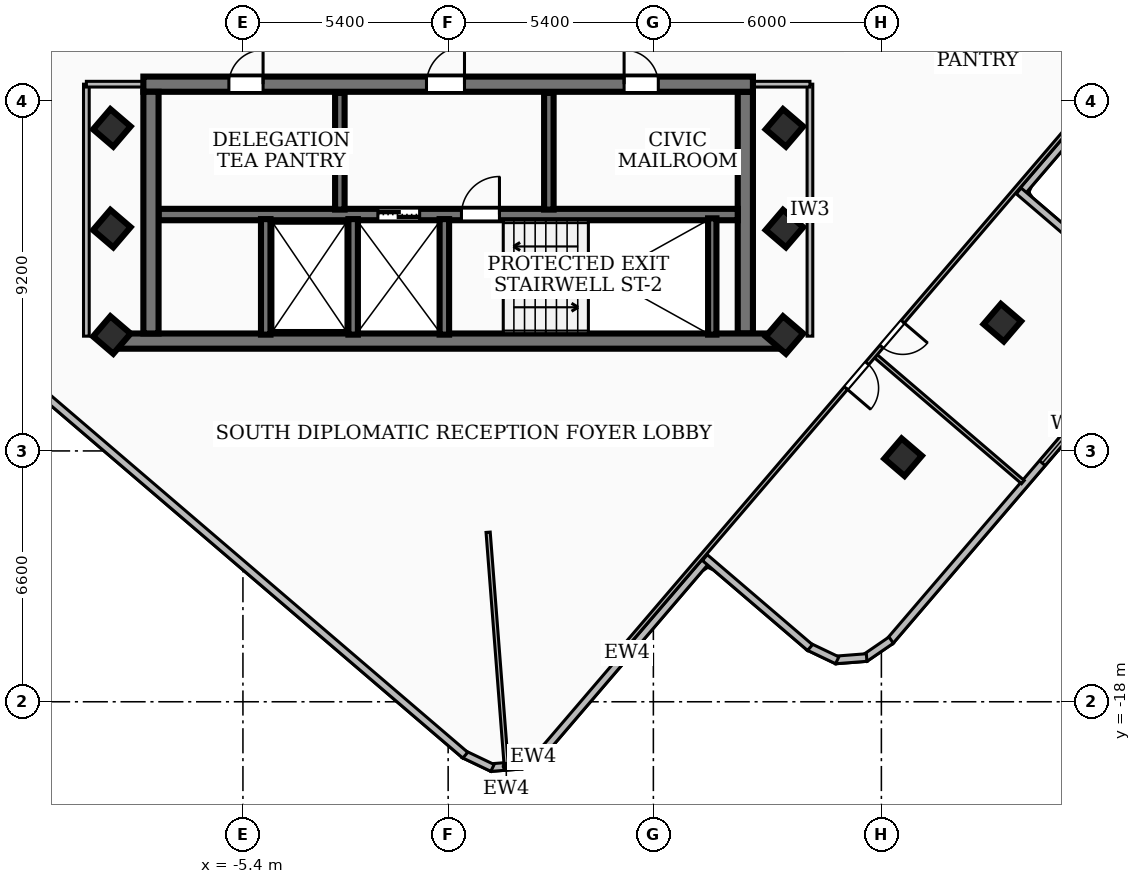
"""IFC4 building model, lengths in metres.
Left out: names, types, materials, properties, quantities, classifications, styles, units other than length and angle.
Written with IfcOpenShell. Run it as: python <this file> out.ifc"""

import sys

from ifc_helpers import new_model, si_unit, direction, frame, frame_2d, origin, origin_2d, place, context, subcontext, project, spatial, rectangle, extrude, element, fill, save


model = new_model("IFC4")
c1 = context("Model", 3, precision=1e-05, world=origin(), true_north=direction((0.0, 1.0)))
c2 = subcontext(c1, "Body", "Model", "MODEL_VIEW")
j1 = project(units=[si_unit("LENGTHUNIT", "METRE"), si_unit("PLANEANGLEUNIT", "RADIAN")], contexts=[c1])
p1 = place(None, origin())
s1 = spatial("IfcSite", under=j1, at=p1, CompositionType="ELEMENT")
p2 = place(p1, origin())
s2 = spatial("IfcBuilding", under=s1, at=p2, CompositionType="ELEMENT")
p3 = place(p2, frame((0.0, 0.0, 254.34)))
s3 = spatial("IfcBuildingStorey", under=s2, at=p3, CompositionType="ELEMENT", Elevation=254.34)
p4 = place(p3, frame((8.78, -8.51, 0.0), z_axis=(0.0, 0.0, 1.0), x_axis=(-1.0, 0.0, 0.0)))
e1 = element("IfcWall", 1, at=p4, inside=s3, PredefinedType="SHEAR", context=c2, shape_type="SweptSolid", body=[
    extrude(rectangle(XDim=17.56, YDim=0.4, at=frame_2d((8.78, 0.0))), origin(), (0.0, 0.0, 1.0), 3.16),
])
p5 = place(p3, frame((-8.02, -1.75, 0.0), z_axis=(0.0, 0.0, 1.0), x_axis=(1.0, 0.0, 0.0)))
e2 = element("IfcWall", 2, at=p5, inside=s3, PredefinedType="SHEAR", context=c2, shape_type="SweptSolid", body=[
    extrude(rectangle(XDim=16.04, YDim=0.4, at=frame_2d((8.02, 0.0))), origin(), (0.0, 0.0, 1.0), 3.16),
])
p6 = place(p5, frame((7.45, 0.0, 0.0)))
e3 = element("IfcOpeningElement", 3, at=p6, cuts=e2, PredefinedType="OPENING", context=c2, shape_type="SweptSolid", body=[
    extrude(rectangle(XDim=1.0, YDim=2.1, at=frame_2d((0.5, 1.05))), frame((0.0, 0.21, 0.0), z_axis=(0.0, -1.0, 0.0), x_axis=(1.0, 0.0, 0.0)), (0.0, 0.0, 1.0), 0.42),
])
p7 = place(p5, frame((12.65, 0.0, 0.0)))
e4 = element("IfcOpeningElement", 4, at=p7, cuts=e2, PredefinedType="OPENING", context=c2, shape_type="SweptSolid", body=[
    extrude(rectangle(XDim=0.9, YDim=2.06, at=frame_2d((0.45, 1.03))), frame((0.0, 0.21, 0.0), z_axis=(0.0, -1.0, 0.0), x_axis=(1.0, 0.0, 0.0)), (0.0, 0.0, 1.0), 0.42),
])
p8 = place(p5, frame((2.25, 0.0, 0.0)))
e5 = element("IfcOpeningElement", 5, at=p8, cuts=e2, PredefinedType="OPENING", context=c2, shape_type="SweptSolid", body=[
    extrude(rectangle(XDim=0.9, YDim=2.06, at=frame_2d((0.45, 1.03))), frame((0.0, 0.21, 0.0), z_axis=(0.0, -1.0, 0.0), x_axis=(1.0, 0.0, 0.0)), (0.0, 0.0, 1.0), 0.42),
])
for number, where, z_axis, x_axis in (
    (6, (-7.82, -8.31, 0.0), (0.0, 0.0, 1.0), (0.0, 1.0, 0.0)),
    (7, (7.82, -1.95, 0.0), (0.0, 0.0, 1.0), (0.0, -1.0, 0.0)),
):
    element("IfcWall", number, at=place(p3, frame(where, z_axis=z_axis, x_axis=x_axis)), inside=s3, PredefinedType="SHEAR", context=c2, shape_type="SweptSolid", body=[
        extrude(rectangle(XDim=6.36, YDim=0.4, at=frame_2d((3.18, 0.0))), origin(), (0.0, 0.0, 1.0), 3.16),
    ])
p9 = place(p3, frame((-7.62, -5.18, 0.0), z_axis=(0.0, 0.0, 1.0), x_axis=(1.0, 0.0, 0.0)))
e8 = element("IfcWall", 8, at=p9, inside=s3, PredefinedType="SOLIDWALL", context=c2, shape_type="SweptSolid", body=[
    extrude(rectangle(XDim=15.24, YDim=0.3, at=frame_2d((7.62, 0.0))), origin(), (0.0, 0.0, 1.0), 3.16),
])
p10 = place(p9, frame((5.77, 0.0, 0.0)))
e9 = element("IfcOpeningElement", 9, at=p10, cuts=e8, PredefinedType="OPENING", context=c2, shape_type="SweptSolid", body=[
    extrude(rectangle(XDim=1.1, YDim=2.15, at=frame_2d((0.55, 1.075))), frame((0.0, 0.16, 0.0), z_axis=(0.0, -1.0, 0.0), x_axis=(1.0, 0.0, 0.0)), (0.0, 0.0, 1.0), 0.32),
])
p11 = place(p9, frame((7.97, 0.0, 0.0)))
e10 = element("IfcOpeningElement", 10, at=p11, cuts=e8, PredefinedType="OPENING", context=c2, shape_type="SweptSolid", body=[
    extrude(rectangle(XDim=1.0, YDim=2.1, at=frame_2d((0.5, 1.05))), frame((0.0, 0.16, 0.0), z_axis=(0.0, -1.0, 0.0), x_axis=(1.0, 0.0, 0.0)), (0.0, 0.0, 1.0), 0.32),
])
p12 = place(p3, frame((6.95, -8.34, 0.0), z_axis=(0.0, 0.0, 1.0), x_axis=(0.0, 1.0, 0.0)))
e11 = element("IfcWall", 11, at=p12, inside=s3, PredefinedType="SOLIDWALL", context=c2, shape_type="SweptSolid", body=[
    extrude(rectangle(XDim=3.06, YDim=0.22, at=frame_2d((1.53, 0.0))), origin(), (0.0, 0.0, 1.0), 3.16),
])
for number, where, z_axis, x_axis in (
    (12, (-0.1, -8.34, 0.0), (0.0, 0.0, 1.0), (0.0, 1.0, 0.0)),
    (13, (-2.5, -8.34, 0.0), (0.0, 0.0, 1.0), (0.0, 1.0, 0.0)),
    (14, (-4.8, -8.34, 0.0), (0.0, 0.0, 1.0), (0.0, 1.0, 0.0)),
):
    element("IfcWall", number, at=place(p3, frame(where, z_axis=z_axis, x_axis=x_axis)), inside=s3, PredefinedType="SOLIDWALL", context=c2, shape_type="SweptSolid", body=[
        extrude(rectangle(XDim=3.04, YDim=0.25, at=frame_2d((1.52, 0.0))), origin(), (0.0, 0.0, 1.0), 3.16),
    ])
for number, where, z_axis, x_axis in (
    (15, (-2.85, -5.05, 0.0), (0.0, 0.0, 1.0), (0.0, 1.0, 0.0)),
    (16, (2.65, -5.05, 0.0), (0.0, 0.0, 1.0), (0.0, 1.0, 0.0)),
):
    element("IfcWall", number, at=place(p3, frame(where, z_axis=z_axis, x_axis=x_axis)), inside=s3, PredefinedType="SOLIDWALL", context=c2, shape_type="SweptSolid", body=[
        extrude(rectangle(XDim=3.07, YDim=0.25, at=frame_2d((1.535, 0.0))), origin(), (0.0, 0.0, 1.0), 3.16),
    ])
for number, where, z_axis, x_axis in (
    (17, (-8.85, -5.55, 0.0), (0.0, 0.0, 1.0), (0.65, 0.76, 0.0)),
    (18, (-8.85, -2.9, 0.0), (0.0, 0.0, 1.0), (0.65, 0.76, 0.0)),
    (19, (8.85, -5.55, 0.0), (0.0, 0.0, 1.0), (0.65, 0.76, 0.0)),
    (20, (8.85, -2.9, 0.0), (0.0, 0.0, 1.0), (0.65, 0.76, 0.0)),
    (21, (8.85, -8.35, 0.0), (0.0, 0.0, 1.0), (0.65, 0.76, 0.0)),
    (22, (-8.85, -8.35, 0.0), (0.0, 0.0, 1.0), (0.65, 0.76, 0.0)),
    (23, (11.971, -11.566, 0.0), (0.0, 0.0, 1.0), (0.65, 0.76, 0.0)),
    (24, (14.583, -8.026, 0.0), (0.0, 0.0, 1.0), (0.65, 0.76, 0.0)),
):
    element("IfcColumn", number, at=place(p3, frame(where, z_axis=z_axis, x_axis=x_axis)), inside=s3, PredefinedType="COLUMN", context=c2, shape_type="SweptSolid", body=[
        extrude(rectangle(XDim=0.7, YDim=0.7, at=origin_2d()), origin(), (0.0, 0.0, 1.0), 3.42),
    ])
p13 = place(p3, frame((6.868, -14.198, 0.0), z_axis=(0.0, 0.0, 1.0), x_axis=(-0.650240147413, -0.759728734939, 0.0)))
e25 = element("IfcWall", 25, at=p13, inside=s3, PredefinedType="SOLIDWALL", context=c2, shape_type="SweptSolid", body=[
    extrude(rectangle(XDim=6.64, YDim=0.2, at=frame_2d((3.32, 0.0))), origin(), (0.0, 0.0, 1.0), 3.16),
])
p14 = place(p3, frame((2.587, -19.21, 0.0), z_axis=(0.0, 0.0, 1.0), x_axis=(-0.824907237821, -0.565268121329, 0.0)))
e26 = element("IfcWall", 26, at=p14, inside=s3, PredefinedType="SOLIDWALL", context=c2, shape_type="SweptSolid", body=[
    extrude(rectangle(XDim=0.839, YDim=0.2, at=frame_2d((0.419, 0.0))), origin(), (0.0, 0.0, 1.0), 3.16),
])
p15 = place(p3, frame((1.941, -19.668, 0.0), z_axis=(0.0, 0.0, 1.0), x_axis=(-0.996986164412, -0.077579558977, 0.0)))
e27 = element("IfcWall", 27, at=p15, inside=s3, PredefinedType="SOLIDWALL", context=c2, shape_type="SweptSolid", body=[
    extrude(rectangle(XDim=0.824, YDim=0.2, at=frame_2d((0.412, 0.0))), origin(), (0.0, 0.0, 1.0), 3.16),
])
p16 = place(p3, frame((1.167, -19.741, 0.0), z_axis=(0.0, 0.0, 1.0), x_axis=(-0.902360330408, 0.430982405796, 0.0)))
e28 = element("IfcWall", 28, at=p16, inside=s3, PredefinedType="SOLIDWALL", context=c2, shape_type="SweptSolid", body=[
    extrude(rectangle(XDim=0.84, YDim=0.2, at=frame_2d((0.42, 0.0))), origin(), (0.0, 0.0, 1.0), 3.16),
])
p17 = place(p3, frame((0.451, -19.406, 0.0), z_axis=(0.0, 0.0, 1.0), x_axis=(-0.759723103319, 0.650246727238, 0.0)))
e29 = element("IfcWall", 29, at=p17, inside=s3, PredefinedType="SOLIDWALL", context=c2, shape_type="SweptSolid", body=[
    extrude(rectangle(XDim=25.922, YDim=0.2, at=frame_2d((12.961, 0.0))), origin(), (0.0, 0.0, 1.0), 3.16),
])
p18 = place(p17, frame((19.32, 0.0, 0.85)))
e30 = element("IfcOpeningElement", 30, at=p18, cuts=e29, PredefinedType="OPENING", context=c2, shape_type="SweptSolid", body=[
    extrude(rectangle(XDim=1.8, YDim=2.0, at=frame_2d((0.9, 1.0))), frame((0.0, 0.11, 0.0), z_axis=(0.0, -1.0, 0.0), x_axis=(1.0, 0.0, 0.0)), (0.0, 0.0, 1.0), 0.22),
])
p19 = place(p3, frame((19.406, 0.451, 0.0), z_axis=(0.0, 0.0, 1.0), x_axis=(-0.650185720357, -0.759775314842, 0.0)))
e31 = element("IfcWall", 31, at=p19, inside=s3, PredefinedType="SOLIDWALL", context=c2, shape_type="SweptSolid", body=[
    extrude(rectangle(XDim=6.741, YDim=0.2, at=frame_2d((3.371, 0.0))), origin(), (0.0, 0.0, 1.0), 3.16),
])
p20 = place(p3, frame((15.014, -4.558, 0.0), z_axis=(0.0, 0.0, 1.0), x_axis=(0.759781598798, -0.650178377161, 0.0)))
e32 = element("IfcWall", 32, at=p20, inside=s3, PredefinedType="SOLIDWALL", context=c2, shape_type="SweptSolid", body=[
    extrude(rectangle(XDim=3.642, YDim=0.2, at=frame_2d((1.821, 0.0))), origin(), (0.0, 0.0, 1.0), 3.16),
])
p21 = place(p3, frame((17.943, -9.024, 0.0), z_axis=(0.0, 0.0, 1.0), x_axis=(-0.650218389303, -0.759747356831, 0.0)))
e33 = element("IfcWall", 33, at=p21, inside=s3, PredefinedType="SOLIDWALL", context=c2, shape_type="SweptSolid", body=[
    extrude(rectangle(XDim=9.723, YDim=0.2, at=frame_2d((4.861, 0.0))), origin(), (0.0, 0.0, 1.0), 3.16),
])
p22 = place(p21, frame((0.85, 0.0, 0.85)))
e34 = element("IfcOpeningElement", 34, at=p22, cuts=e33, PredefinedType="OPENING", context=c2, shape_type="SweptSolid", body=[
    extrude(rectangle(XDim=2.7, YDim=1.65, at=frame_2d((1.35, 0.825))), frame((0.0, 0.11, 0.0), z_axis=(0.0, -1.0, 0.0), x_axis=(1.0, 0.0, 0.0)), (0.0, 0.0, 1.0), 0.22),
])
p23 = place(p3, frame((11.658, -16.378, 0.0), z_axis=(0.0, 0.0, 1.0), x_axis=(-0.824907237821, -0.565268121329, 0.0)))
e35 = element("IfcWall", 35, at=p23, inside=s3, PredefinedType="SOLIDWALL", context=c2, shape_type="SweptSolid", body=[
    extrude(rectangle(XDim=0.839, YDim=0.2, at=frame_2d((0.419, 0.0))), origin(), (0.0, 0.0, 1.0), 3.16),
])
p24 = place(p3, frame((11.012, -16.836, 0.0), z_axis=(0.0, 0.0, 1.0), x_axis=(-0.996986164412, -0.077579558977, 0.0)))
e36 = element("IfcWall", 36, at=p24, inside=s3, PredefinedType="SOLIDWALL", context=c2, shape_type="SweptSolid", body=[
    extrude(rectangle(XDim=0.824, YDim=0.2, at=frame_2d((0.412, 0.0))), origin(), (0.0, 0.0, 1.0), 3.16),
])
p25 = place(p3, frame((10.238, -16.909, 0.0), z_axis=(0.0, 0.0, 1.0), x_axis=(-0.902473334209, 0.430745726666, 0.0)))
e37 = element("IfcWall", 37, at=p25, inside=s3, PredefinedType="SOLIDWALL", context=c2, shape_type="SweptSolid", body=[
    extrude(rectangle(XDim=0.84, YDim=0.2, at=frame_2d((0.42, 0.0))), origin(), (0.0, 0.0, 1.0), 3.16),
])
p26 = place(p3, frame((9.522, -16.574, 0.0), z_axis=(0.0, 0.0, 1.0), x_axis=(-0.759914066759, 0.650023546606, 0.0)))
e38 = element("IfcWall", 38, at=p26, inside=s3, PredefinedType="SOLIDWALL", context=c2, shape_type="SweptSolid", body=[
    extrude(rectangle(XDim=3.641, YDim=0.2, at=frame_2d((1.821, 0.0))), origin(), (0.0, 0.0, 1.0), 3.16),
])
p27 = place(p3, frame((-9.52, -8.38, 0.0), z_axis=(0.0, 0.0, 1.0), x_axis=(0.0, 1.0, 0.0)))
e39 = element("IfcWall", 39, at=p27, inside=s3, PredefinedType="PARTITIONING", context=c2, shape_type="SweptSolid", body=[
    extrude(rectangle(XDim=6.63, YDim=0.15, at=frame_2d((3.315, 0.0))), origin(), (0.0, 0.0, 1.0), 3.16),
])
p28 = place(p3, frame((-7.85, -1.75, 0.0), z_axis=(0.0, 0.0, 1.0), x_axis=(-1.0, 0.0, 0.0)))
e40 = element("IfcWall", 40, at=p28, inside=s3, PredefinedType="PARTITIONING", context=c2, shape_type="SweptSolid", body=[
    extrude(rectangle(XDim=1.67, YDim=0.15, at=frame_2d((0.835, 0.0))), origin(), (0.0, 0.0, 1.0), 2.39),
])
p29 = place(p3, frame((9.52, -8.38, 0.0), z_axis=(0.0, 0.0, 1.0), x_axis=(0.0, 1.0, 0.0)))
e41 = element("IfcWall", 41, at=p29, inside=s3, PredefinedType="PARTITIONING", context=c2, shape_type="SweptSolid", body=[
    extrude(rectangle(XDim=6.63, YDim=0.15, at=frame_2d((3.315, 0.0))), origin(), (0.0, 0.0, 1.0), 2.53),
])
p30 = place(p3, frame((7.85, -1.75, 0.0), z_axis=(0.0, 0.0, 1.0), x_axis=(1.0, 0.0, 0.0)))
e42 = element("IfcWall", 42, at=p30, inside=s3, PredefinedType="PARTITIONING", context=c2, shape_type="SweptSolid", body=[
    extrude(rectangle(XDim=1.67, YDim=0.15, at=frame_2d((0.835, 0.0))), origin(), (0.0, 0.0, 1.0), 2.39),
])
p31 = place(p3, frame((1.052, -13.54, 0.0), z_axis=(0.0, 0.0, 1.0), x_axis=(0.077356131702, -0.997003525013, 0.0)))
e43 = element("IfcWall", 43, at=p31, inside=s3, PredefinedType="PARTITIONING", context=c2, shape_type="SweptSolid", body=[
    extrude(rectangle(XDim=6.113, YDim=0.11, at=frame_2d((3.057, 0.0))), origin(), (0.0, 0.0, 1.0), 3.16),
])
p32 = place(p3, frame((11.26, -8.913, 0.0), z_axis=(0.0, 0.0, 1.0), x_axis=(0.759673292451, -0.650304919816, 0.0)))
e44 = element("IfcWall", 44, at=p32, inside=s3, PredefinedType="PARTITIONING", context=c2, shape_type="SweptSolid", body=[
    extrude(rectangle(XDim=5.085, YDim=0.11, at=frame_2d((2.542, 0.0))), origin(), (0.0, 0.0, 1.0), 3.16),
])
p33 = place(p3, frame((17.437, -1.604, 0.0), z_axis=(0.0, 0.0, 1.0), x_axis=(-0.650265099033, -0.759707378522, 0.0)))
e45 = element("IfcWall", 45, at=p33, inside=s3, PredefinedType="PARTITIONING", context=c2, shape_type="SweptSolid", body=[
    extrude(rectangle(XDim=20.139, YDim=0.11, at=frame_2d((10.07, 0.0))), origin(), (0.0, 0.0, 1.0), 2.53),
])
p34 = place(p33, frame((9.859, 0.0, 0.0)))
e46 = element("IfcOpeningElement", 46, at=p34, cuts=e45, PredefinedType="OPENING", context=c2, shape_type="SweptSolid", body=[
    extrude(rectangle(XDim=0.86, YDim=2.04, at=frame_2d((0.43, 1.02))), frame((0.0, 0.065, 0.0), z_axis=(0.0, -1.0, 0.0), x_axis=(1.0, 0.0, 0.0)), (0.0, 0.0, 1.0), 0.13),
])
p35 = place(p33, frame((8.419, 0.0, 0.0)))
e47 = element("IfcOpeningElement", 47, at=p35, cuts=e45, PredefinedType="OPENING", context=c2, shape_type="SweptSolid", body=[
    extrude(rectangle(XDim=0.86, YDim=2.04, at=frame_2d((0.43, 1.02))), frame((0.0, 0.065, 0.0), z_axis=(0.0, -1.0, 0.0), x_axis=(1.0, 0.0, 0.0)), (0.0, 0.0, 1.0), 0.13),
])
p36 = place(p22, origin())
e48 = element("IfcWindow", 48, at=p36, inside=s3, PartitioningType="SINGLE_PANEL", PredefinedType="WINDOW", context=c2, shape_type="SweptSolid", body=[
    extrude(rectangle(XDim=2.7, YDim=1.65, at=frame_2d((1.35, 0.825))), frame((0.0, 0.03, 0.0), z_axis=(0.0, -1.0, 0.0), x_axis=(1.0, 0.0, 0.0)), (0.0, 0.0, 1.0), 0.06),
])
fill(e34, e48)
p37 = place(p6, origin())
e49 = element("IfcDoor", 49, at=p37, inside=s3, OperationType="SINGLE_SWING_RIGHT", PredefinedType="DOOR", context=c2, shape_type="SweptSolid", body=[
    extrude(rectangle(XDim=1.0, YDim=2.1, at=frame_2d((0.5, 1.05))), frame((0.0, 0.025, 0.0), z_axis=(0.0, -1.0, 0.0), x_axis=(1.0, 0.0, 0.0)), (0.0, 0.0, 1.0), 0.05),
])
fill(e3, e49)
p38 = place(p10, origin())
e50 = element("IfcDoor", 50, at=p38, inside=s3, OperationType="DOUBLE_DOOR_SLIDING", PredefinedType="DOOR", context=c2, shape_type="SweptSolid", body=[
    extrude(rectangle(XDim=1.1, YDim=2.15, at=frame_2d((0.55, 1.075))), frame((0.0, 0.025, 0.0), z_axis=(0.0, -1.0, 0.0), x_axis=(1.0, 0.0, 0.0)), (0.0, 0.0, 1.0), 0.05),
])
fill(e9, e50)
p39 = place(p11, origin())
e51 = element("IfcDoor", 51, at=p39, inside=s3, OperationType="SINGLE_SWING_RIGHT", PredefinedType="DOOR", context=c2, shape_type="SweptSolid", body=[
    extrude(rectangle(XDim=1.0, YDim=2.1, at=frame_2d((0.5, 1.05))), frame((0.0, 0.025, 0.0), z_axis=(0.0, -1.0, 0.0), x_axis=(1.0, 0.0, 0.0)), (0.0, 0.0, 1.0), 0.05),
])
fill(e10, e51)
p40 = place(p7, origin())
e52 = element("IfcDoor", 52, at=p40, inside=s3, OperationType="SINGLE_SWING_LEFT", PredefinedType="DOOR", context=c2, shape_type="SweptSolid", body=[
    extrude(rectangle(XDim=0.9, YDim=2.06, at=frame_2d((0.45, 1.03))), frame((0.0, 0.025, 0.0), z_axis=(0.0, -1.0, 0.0), x_axis=(1.0, 0.0, 0.0)), (0.0, 0.0, 1.0), 0.05),
])
fill(e4, e52)
p41 = place(p8, origin())
e53 = element("IfcDoor", 53, at=p41, inside=s3, OperationType="SINGLE_SWING_RIGHT", PredefinedType="DOOR", context=c2, shape_type="SweptSolid", body=[
    extrude(rectangle(XDim=0.9, YDim=2.06, at=frame_2d((0.45, 1.03))), frame((0.0, 0.025, 0.0), z_axis=(0.0, -1.0, 0.0), x_axis=(1.0, 0.0, 0.0)), (0.0, 0.0, 1.0), 0.05),
])
fill(e5, e53)
p42 = place(p34, origin())
e54 = element("IfcDoor", 54, at=p42, inside=s3, OperationType="SINGLE_SWING_RIGHT", PredefinedType="DOOR", context=c2, shape_type="SweptSolid", body=[
    extrude(rectangle(XDim=0.86, YDim=2.04, at=frame_2d((0.43, 1.02))), frame((0.0, 0.025, 0.0), z_axis=(0.0, -1.0, 0.0), x_axis=(1.0, 0.0, 0.0)), (0.0, 0.0, 1.0), 0.05),
])
fill(e46, e54)
p43 = place(p35, origin())
e55 = element("IfcDoor", 55, at=p43, inside=s3, OperationType="SINGLE_SWING_LEFT", PredefinedType="DOOR", context=c2, shape_type="SweptSolid", body=[
    extrude(rectangle(XDim=0.86, YDim=2.04, at=frame_2d((0.43, 1.02))), frame((0.0, 0.025, 0.0), z_axis=(0.0, -1.0, 0.0), x_axis=(1.0, 0.0, 0.0)), (0.0, 0.0, 1.0), 0.05),
])
fill(e47, e55)
save(model, sys.argv[1])
